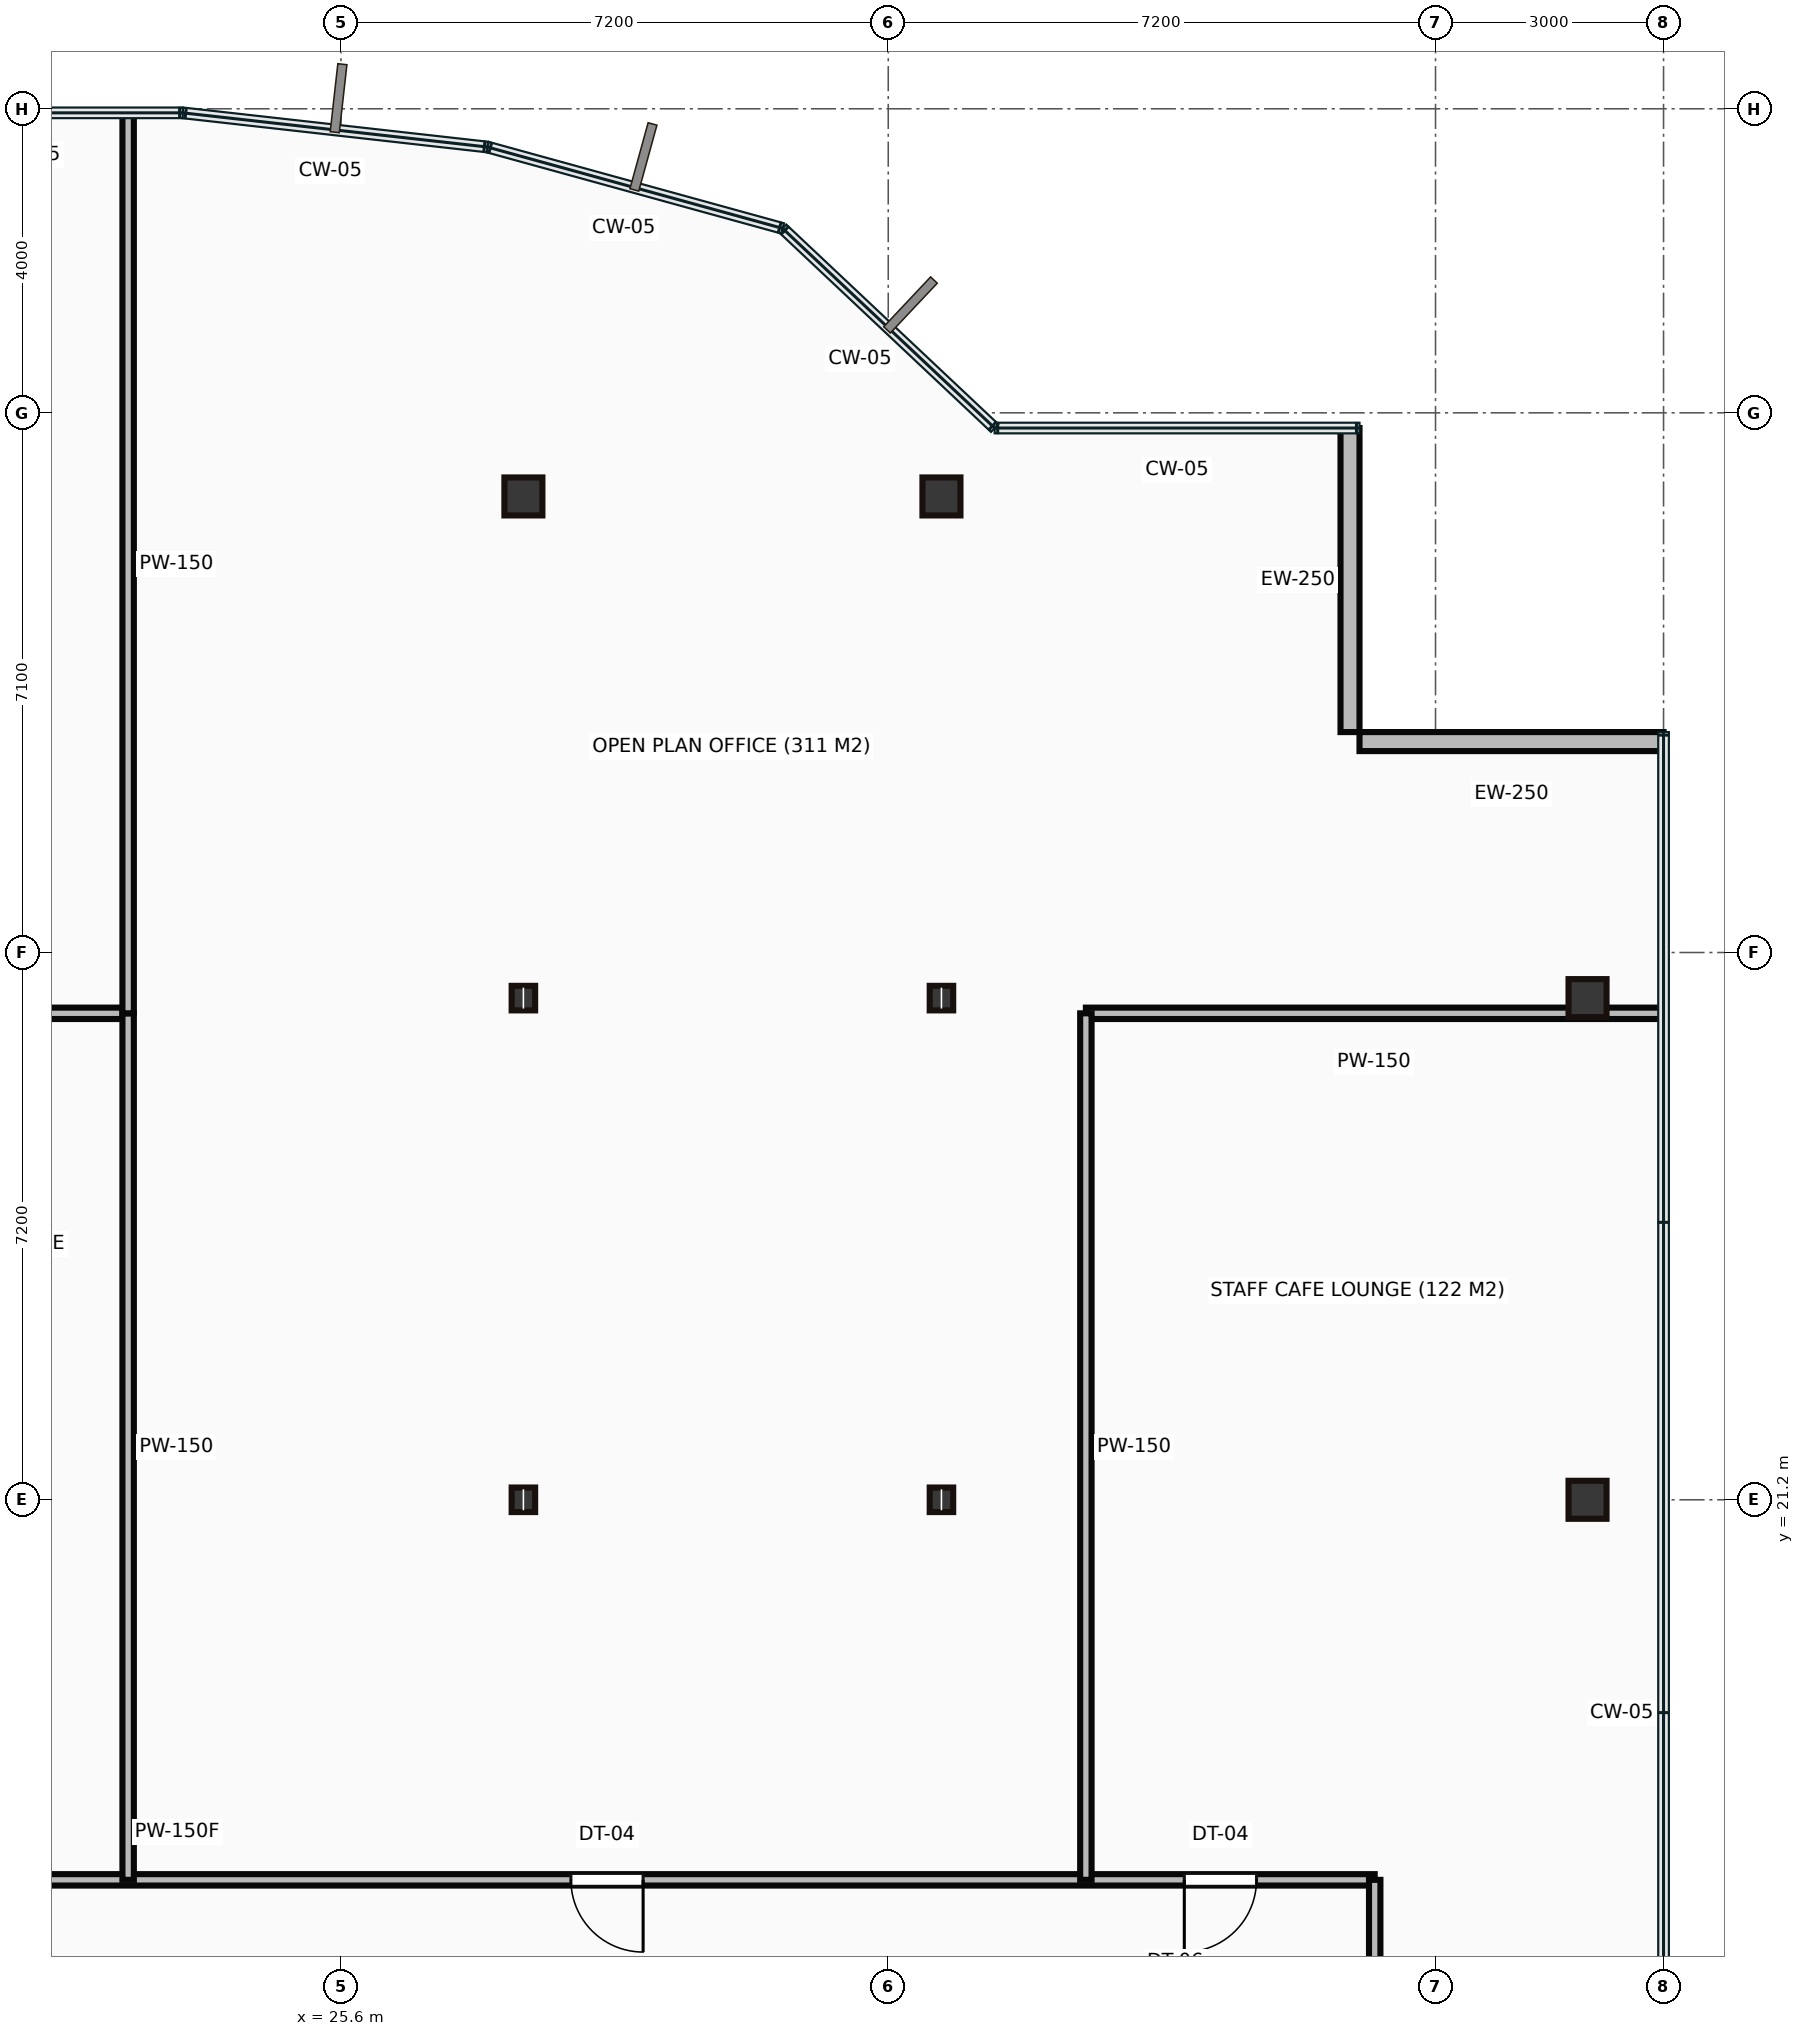
"""IFC4 building model, lengths in metres.
Left out: names, types, materials, properties, quantities, classifications, styles, units other than length and angle.
Written with IfcOpenShell. Run it as: python <this file> out.ifc"""

import sys

from ifc_helpers import new_model, si_unit, direction, frame, frame_2d, origin, origin_2d, place, context, subcontext, project, spatial, rectangle, hollow_rectangle, i_section, extrude, source, transform, mapped, element, fill, save


model = new_model("IFC4")
c1 = context("Model", 3, precision=1e-05, world=origin(), true_north=direction((0.0, 1.0)))
c2 = subcontext(c1, "Body", "Model", "MODEL_VIEW")
j1 = project(units=[si_unit("LENGTHUNIT", "METRE"), si_unit("PLANEANGLEUNIT", "RADIAN")], contexts=[c1])
p1 = place(None, origin())
s1 = spatial("IfcSite", under=j1, at=p1, CompositionType="ELEMENT")
p2 = place(p1, origin())
s2 = spatial("IfcBuilding", under=s1, at=p2, CompositionType="ELEMENT")
p3 = place(p2, frame((0.0, 0.0, 192.25)))
s3 = spatial("IfcBuildingStorey", under=s2, at=p3, CompositionType="ELEMENT", Elevation=192.25)
m1 = source(origin(), c2, "Body", "SweptSolid", [
    extrude(i_section(OverallWidth=0.309, OverallDepth=0.323, WebThickness=0.014, FlangeThickness=0.023, at=origin_2d()), origin(), (0.0, 0.0, 1.0), 3.65),
])
for number, where, z_axis, x_axis in (
    (1, (28.0, 21.2, 0.0), (0.0, 0.0, 1.0), (1.0, 0.0, 0.0)),
    (2, (28.0, 27.8, 0.0), (0.0, 0.0, 1.0), (1.0, 0.0, 0.0)),
):
    element("IfcColumn", number, at=place(p3, frame(where, z_axis=z_axis, x_axis=x_axis)), inside=s3, PredefinedType="COLUMN", context=c2, shape_type="MappedRepresentation", body=[
        mapped(m1, transform((0.0, 0.0, 0.0))),
    ])
m2 = source(origin(), c2, "Body", "SweptSolid", [
    extrude(hollow_rectangle(XDim=0.5, YDim=0.5, WallThickness=0.022, at=origin_2d()), origin(), (0.0, 0.0, 1.0), 3.65),
])
p4 = place(p3, frame((28.0, 34.4, 0.0), z_axis=(0.0, 0.0, 1.0), x_axis=(1.0, 0.0, 0.0)))
e3 = element("IfcColumn", 3, at=p4, inside=s3, PredefinedType="COLUMN", context=c2, shape_type="MappedRepresentation", body=[
    mapped(m2, transform((0.0, 0.0, 0.0))),
])
for number, where, z_axis, x_axis in (
    (4, (33.5, 21.2, 0.0), (0.0, 0.0, 1.0), (1.0, 0.0, 0.0)),
    (5, (33.5, 27.8, 0.0), (0.0, 0.0, 1.0), (1.0, 0.0, 0.0)),
):
    element("IfcColumn", number, at=place(p3, frame(where, z_axis=z_axis, x_axis=x_axis)), inside=s3, PredefinedType="COLUMN", context=c2, shape_type="MappedRepresentation", body=[
        mapped(m1, transform((0.0, 0.0, 0.0))),
    ])
for number, where, z_axis, x_axis in (
    (6, (33.5, 34.4, 0.0), (0.0, 0.0, 1.0), (1.0, 0.0, 0.0)),
    (7, (42.0, 21.2, 0.0), (0.0, 0.0, 1.0), (1.0, 0.0, 0.0)),
    (8, (42.0, 27.8, 0.0), (0.0, 0.0, 1.0), (1.0, 0.0, 0.0)),
):
    element("IfcColumn", number, at=place(p3, frame(where, z_axis=z_axis, x_axis=x_axis)), inside=s3, PredefinedType="COLUMN", context=c2, shape_type="MappedRepresentation", body=[
        mapped(m2, transform((0.0, 0.0, 0.0))),
    ])
m3 = source(origin(), c2, "Body", "SweptSolid", [
    extrude(rectangle(XDim=4.0, YDim=0.25, at=frame_2d((2.0, 0.0))), origin(), (0.0, 0.0, 1.0), 3.4),
])
for number, where, z_axis, x_axis in (
    (9, (43.0, 31.175, 0.0), (0.0, 0.0, 1.0), (-1.0, 0.0, 0.0)),
    (10, (38.875, 31.3, 0.0), (0.0, 0.0, 1.0), (0.0, 1.0, 0.0)),
):
    element("IfcWall", number, at=place(p3, frame(where, z_axis=z_axis, x_axis=x_axis)), inside=s3, PredefinedType="STANDARD", context=c2, shape_type="MappedRepresentation", body=[
        mapped(m3, transform((0.0, 0.0, 0.0))),
    ])
m4 = source(origin(), c2, "Body", "SweptSolid", [
    extrude(rectangle(XDim=20.2, YDim=0.15, at=frame_2d((10.1, 0.0))), origin(), (0.0, 0.0, 1.0), 3.4),
])
p5 = place(p3, frame((19.0, 16.2, 0.0), z_axis=(0.0, 0.0, 1.0), x_axis=(1.0, 0.0, 0.0)))
e11 = element("IfcWall", 11, at=p5, inside=s3, PredefinedType="PARTITIONING", context=c2, shape_type="MappedRepresentation", body=[
    mapped(m4, transform((0.0, 0.0, 0.0))),
])
p6 = place(p5, frame((9.625, 0.0, 0.0)))
e12 = element("IfcOpeningElement", 12, at=p6, cuts=e11, PredefinedType="OPENING", context=c2, shape_type="SweptSolid", body=[
    extrude(rectangle(XDim=0.95, YDim=2.15, at=frame_2d((0.475, 1.075))), frame((0.0, 0.085, 0.0), z_axis=(0.0, -1.0, 0.0), x_axis=(1.0, 0.0, 0.0)), (0.0, 0.0, 1.0), 0.17),
])
p7 = place(p5, frame((17.695, 0.0, 0.0)))
e13 = element("IfcOpeningElement", 13, at=p7, cuts=e11, PredefinedType="OPENING", context=c2, shape_type="SweptSolid", body=[
    extrude(rectangle(XDim=0.95, YDim=2.15, at=frame_2d((0.475, 1.075))), frame((0.0, 0.085, 0.0), z_axis=(0.0, -1.0, 0.0), x_axis=(1.0, 0.0, 0.0)), (0.0, 0.0, 1.0), 0.17),
])
m5 = source(origin(), c2, "Body", "SweptSolid", [
    extrude(rectangle(XDim=2.2, YDim=0.15, at=frame_2d((1.1, 0.0))), origin(), (0.0, 0.0, 1.0), 3.4),
])
p8 = place(p3, frame((39.2, 16.2, 0.0), z_axis=(0.0, 0.0, 1.0), x_axis=(0.0, -1.0, 0.0)))
e14 = element("IfcWall", 14, at=p8, inside=s3, PredefinedType="PARTITIONING", context=c2, shape_type="MappedRepresentation", body=[
    mapped(m5, transform((0.0, 0.0, 0.0))),
])
m6 = source(origin(), c2, "Body", "SweptSolid", [
    extrude(rectangle(XDim=3.8, YDim=0.15, at=frame_2d((1.9, 0.0))), origin(), (0.0, 0.0, 1.0), 3.4),
])
p9 = place(p3, frame((22.8, 27.6, 0.0), z_axis=(0.0, 0.0, 1.0), x_axis=(-1.0, 0.0, 0.0)))
e15 = element("IfcWall", 15, at=p9, inside=s3, PredefinedType="PARTITIONING", context=c2, shape_type="MappedRepresentation", body=[
    mapped(m6, transform((0.0, 0.0, 0.0))),
])
m7 = source(origin(), c2, "Body", "SweptSolid", [
    extrude(rectangle(XDim=11.4, YDim=0.15, at=frame_2d((5.7, 0.0))), origin(), (0.0, 0.0, 1.0), 3.4),
])
p10 = place(p3, frame((22.8, 27.6, 0.0), z_axis=(0.0, 0.0, 1.0), x_axis=(0.0, -1.0, 0.0)))
e16 = element("IfcWall", 16, at=p10, inside=s3, PredefinedType="PARTITIONING", context=c2, shape_type="MappedRepresentation", body=[
    mapped(m7, transform((0.0, 0.0, 0.0))),
])
m8 = source(origin(), c2, "Body", "SweptSolid", [
    extrude(rectangle(XDim=11.827, YDim=0.15, at=frame_2d((5.913, 0.0))), origin(), (0.0, 0.0, 1.0), 3.4),
])
p11 = place(p3, frame((22.8, 39.427, 0.0), z_axis=(0.0, 0.0, 1.0), x_axis=(0.0, -1.0, 0.0)))
e17 = element("IfcWall", 17, at=p11, inside=s3, PredefinedType="PARTITIONING", context=c2, shape_type="MappedRepresentation", body=[
    mapped(m8, transform((0.0, 0.0, 0.0))),
])
m9 = source(origin(), c2, "Body", "SweptSolid", [
    extrude(rectangle(XDim=7.58, YDim=0.15, at=frame_2d((3.79, 0.0))), origin(), (0.0, 0.0, 1.0), 3.4),
])
p12 = place(p3, frame((42.98, 27.6, 0.0), z_axis=(0.0, 0.0, 1.0), x_axis=(-1.0, 0.0, 0.0)))
e18 = element("IfcWall", 18, at=p12, inside=s3, PredefinedType="PARTITIONING", context=c2, shape_type="MappedRepresentation", body=[
    mapped(m9, transform((0.0, 0.0, 0.0))),
])
p13 = place(p3, frame((35.4, 27.6, 0.0), z_axis=(0.0, 0.0, 1.0), x_axis=(0.0, -1.0, 0.0)))
e19 = element("IfcWall", 19, at=p13, inside=s3, PredefinedType="PARTITIONING", context=c2, shape_type="MappedRepresentation", body=[
    mapped(m7, transform((0.0, 0.0, 0.0))),
])
m10 = source(origin(), c2, "Body", "SweptSolid", [
    extrude(rectangle(XDim=0.95, YDim=2.15, at=frame_2d((0.475, 1.075))), frame((0.0, 0.025, 0.0), z_axis=(0.0, -1.0, 0.0), x_axis=(1.0, 0.0, 0.0)), (0.0, 0.0, 1.0), 0.05),
])
p14 = place(p6, origin())
e20 = element("IfcDoor", 20, at=p14, inside=s3, OperationType="SINGLE_SWING_RIGHT", PredefinedType="DOOR", context=c2, shape_type="MappedRepresentation", body=[
    mapped(m10, transform((0.0, 0.0, 0.0))),
])
fill(e12, e20)
p15 = place(p7, origin())
e21 = element("IfcDoor", 21, at=p15, inside=s3, OperationType="SINGLE_SWING_LEFT", PredefinedType="DOOR", context=c2, shape_type="MappedRepresentation", body=[
    mapped(m10, transform((0.0, 0.0, 0.0))),
])
fill(e13, e21)
save(model, sys.argv[1])
